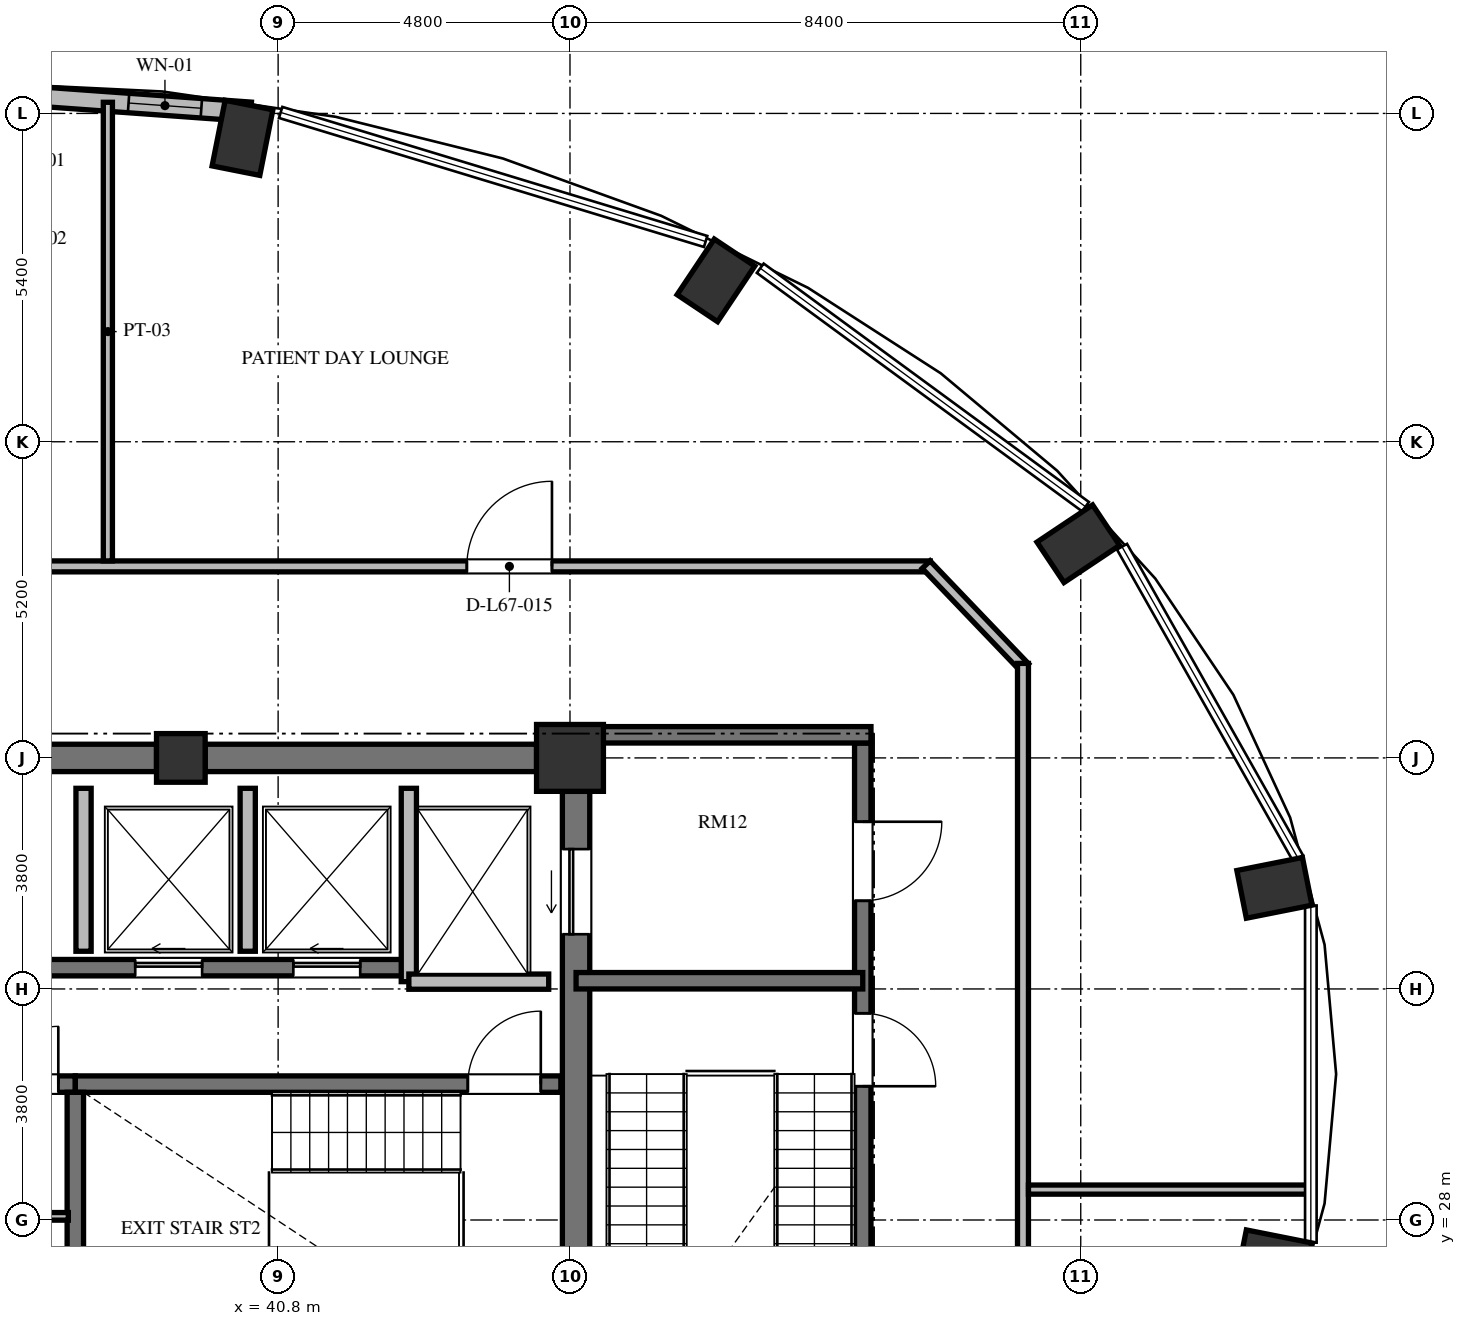
"""IFC4 building model, lengths in metres.
Left out: names, types, materials, properties, quantities, classifications, styles, units other than length and angle.
Written with IfcOpenShell. Run it as: python <this file> out.ifc"""

import sys

from ifc_helpers import new_model, si_unit, direction, frame, frame_2d, origin, origin_2d, place, context, subcontext, project, spatial, rectangle, extrude, element, fill, save


model = new_model("IFC4")
c1 = context("Model", 3, precision=1e-05, world=origin(), true_north=direction((0.0, 1.0)))
c2 = subcontext(c1, "Body", "Model", "MODEL_VIEW")
j1 = project(units=[si_unit("LENGTHUNIT", "METRE"), si_unit("PLANEANGLEUNIT", "RADIAN")], contexts=[c1])
p1 = place(None, origin())
s1 = spatial("IfcSite", under=j1, at=p1, CompositionType="ELEMENT")
p2 = place(p1, origin())
s2 = spatial("IfcBuilding", under=s1, at=p2, CompositionType="ELEMENT")
p3 = place(p2, frame((0.0, 0.0, 258.672)))
s3 = spatial("IfcBuildingStorey", under=s2, at=p3, CompositionType="ELEMENT", Elevation=258.672)
for number, where, z_axis, x_axis in (
    (1, (57.185, 27.337, 0.0), (0.0, 0.0, 1.0), (0.981, -0.195, 0.0)),
    (2, (57.185, 33.463, 0.0), (0.0, 0.0, 1.0), (0.981, 0.195, 0.0)),
    (3, (53.96, 39.123, 0.0), (0.0, 0.0, 1.0), (0.831, 0.556, 0.0)),
    (4, (48.0, 43.454, 0.0), (0.0, 0.0, 1.0), (0.556, 0.831, 0.0)),
    (5, (40.214, 45.798, 0.0), (0.0, 0.0, 1.0), (0.195, 0.981, 0.0)),
):
    element("IfcColumn", number, at=place(p3, frame(where, z_axis=z_axis, x_axis=x_axis)), inside=s3, PredefinedType="COLUMN", context=c2, shape_type="SweptSolid", body=[
        extrude(rectangle(XDim=1.1, YDim=0.8, at=origin_2d()), origin(), (0.0, 0.0, 1.0), 3.648),
    ])
p4 = place(p3, frame((45.6, 35.6, 0.0), z_axis=(0.0, 0.0, 1.0), x_axis=(1.0, 0.0, 0.0)))
e6 = element("IfcColumn", 6, at=p4, inside=s3, PredefinedType="COLUMN", context=c2, shape_type="SweptSolid", body=[
    extrude(rectangle(XDim=1.1, YDim=1.1, at=origin_2d()), origin(), (0.0, 0.0, 1.0), 3.648),
])
p5 = place(p3, frame((39.2, 35.6, 0.0), z_axis=(0.0, 0.0, 1.0), x_axis=(1.0, 0.0, 0.0)))
e7 = element("IfcColumn", 7, at=p5, inside=s3, PredefinedType="COLUMN", context=c2, shape_type="SweptSolid", body=[
    extrude(rectangle(XDim=0.8, YDim=0.8, at=origin_2d()), origin(), (0.0, 0.0, 1.0), 3.648),
])
p6 = place(p3, frame((45.7, 20.95, 0.0), z_axis=(0.0, 0.0, 1.0), x_axis=(0.0, 1.0, 0.0)))
e8 = element("IfcWall", 8, at=p6, inside=s3, PredefinedType="SHEAR", context=c2, shape_type="SweptSolid", body=[
    extrude(rectangle(XDim=14.1, YDim=0.45, at=frame_2d((7.05, 0.0))), origin(), (0.0, 0.0, 1.0), 3.648),
])
p7 = place(p6, frame((11.75, 0.0, 0.0)))
e9 = element("IfcOpeningElement", 9, at=p7, cuts=e8, PredefinedType="OPENING", context=c2, shape_type="SweptSolid", body=[
    extrude(rectangle(XDim=1.4, YDim=2.3, at=frame_2d((0.7, 1.15))), frame((0.0, 0.235, 0.0), z_axis=(0.0, -1.0, 0.0), x_axis=(1.0, 0.0, 0.0)), (0.0, 0.0, 1.0), 0.47),
])
p8 = place(p6, frame((0.95, 0.0, 0.0)))
e10 = element("IfcOpeningElement", 10, at=p8, cuts=e8, PredefinedType="OPENING", context=c2, shape_type="SweptSolid", body=[
    extrude(rectangle(XDim=1.4, YDim=2.3, at=frame_2d((0.7, 1.15))), frame((0.0, 0.235, 0.0), z_axis=(0.0, -1.0, 0.0), x_axis=(1.0, 0.0, 0.0)), (0.0, 0.0, 1.0), 0.47),
])
p9 = place(p3, frame((33.2, 35.6, 0.0), z_axis=(0.0, 0.0, 1.0), x_axis=(1.0, 0.0, 0.0)))
e11 = element("IfcWall", 11, at=p9, inside=s3, PredefinedType="SHEAR", context=c2, shape_type="SweptSolid", body=[
    extrude(rectangle(XDim=5.6, YDim=0.45, at=frame_2d((2.8, 0.0))), origin(), (0.0, 0.0, 1.0), 3.648),
])
p10 = place(p3, frame((39.6, 35.6, 0.0), z_axis=(0.0, 0.0, 1.0), x_axis=(1.0, 0.0, 0.0)))
e12 = element("IfcWall", 12, at=p10, inside=s3, PredefinedType="SHEAR", context=c2, shape_type="SweptSolid", body=[
    extrude(rectangle(XDim=5.45, YDim=0.45, at=frame_2d((2.725, 0.0))), origin(), (0.0, 0.0, 1.0), 3.648),
])
p11 = place(p3, frame((40.35, 46.226, 0.0), z_axis=(0.0, 0.0, 1.0), x_axis=(-0.997409061056, 0.071938619141, 0.0)))
e13 = element("IfcWall", 13, at=p11, inside=s3, PredefinedType="SOLIDWALL", context=c2, shape_type="SweptSolid", body=[
    extrude(rectangle(XDim=4.541, YDim=0.32, at=frame_2d((2.271, 0.0))), origin(), (0.0, 0.0, 1.0), 3.448),
])
p12 = place(p11, frame((0.815, 0.0, 0.85)))
e14 = element("IfcOpeningElement", 14, at=p12, cuts=e13, PredefinedType="OPENING", context=c2, shape_type="SweptSolid", body=[
    extrude(rectangle(XDim=1.2, YDim=2.2, at=frame_2d((0.6, 1.1))), frame((0.0, 0.17, 0.0), z_axis=(0.0, -1.0, 0.0), x_axis=(1.0, 0.0, 0.0)), (0.0, 0.0, 1.0), 0.34),
])
p13 = place(p3, frame((34.535, 30.235, 0.0), z_axis=(0.0, 0.0, 1.0), x_axis=(1.0, 0.0, 0.0)))
e15 = element("IfcWall", 15, at=p13, inside=s3, PredefinedType="SHEAR", context=c2, shape_type="SweptSolid", body=[
    extrude(rectangle(XDim=2.93, YDim=0.27, at=frame_2d((1.465, 0.0))), origin(), (0.0, 0.0, 1.0), 3.648),
])
p14 = place(p13, frame((0.255, 0.0, 0.0)))
e16 = element("IfcOpeningElement", 16, at=p14, cuts=e15, PredefinedType="OPENING", context=c2, shape_type="SweptSolid", body=[
    extrude(rectangle(XDim=1.0, YDim=2.1, at=frame_2d((0.5, 1.05))), frame((0.0, 0.145, 0.0), z_axis=(0.0, -1.0, 0.0), x_axis=(1.0, 0.0, 0.0)), (0.0, 0.0, 1.0), 0.29),
])
p15 = place(p13, frame((1.7, 0.0, 0.0)))
e17 = element("IfcOpeningElement", 17, at=p15, cuts=e15, PredefinedType="OPENING", context=c2, shape_type="SweptSolid", body=[
    extrude(rectangle(XDim=0.95, YDim=2.1, at=frame_2d((0.475, 1.05))), frame((0.0, 0.145, 0.0), z_axis=(0.0, -1.0, 0.0), x_axis=(1.0, 0.0, 0.0)), (0.0, 0.0, 1.0), 0.29),
])
p16 = place(p3, frame((37.465, 30.235, 0.0), z_axis=(0.0, 0.0, 1.0), x_axis=(1.0, 0.0, 0.0)))
e18 = element("IfcWall", 18, at=p16, inside=s3, PredefinedType="SHEAR", context=c2, shape_type="SweptSolid", body=[
    extrude(rectangle(XDim=7.985, YDim=0.27, at=frame_2d((3.992, 0.0))), origin(), (0.0, 0.0, 1.0), 3.648),
])
p17 = place(p16, frame((6.455, 0.0, 0.0)))
e19 = element("IfcOpeningElement", 19, at=p17, cuts=e18, PredefinedType="OPENING", context=c2, shape_type="SweptSolid", body=[
    extrude(rectangle(XDim=1.2, YDim=2.15, at=frame_2d((0.6, 1.075))), frame((0.0, 0.145, 0.0), z_axis=(0.0, -1.0, 0.0), x_axis=(1.0, 0.0, 0.0)), (0.0, 0.0, 1.0), 0.29),
])
p18 = place(p3, frame((37.465, 26.02, 0.0), z_axis=(0.0, 0.0, 1.0), x_axis=(0.0, 1.0, 0.0)))
e20 = element("IfcWall", 20, at=p18, inside=s3, PredefinedType="SHEAR", context=c2, shape_type="SweptSolid", body=[
    extrude(rectangle(XDim=4.08, YDim=0.27, at=frame_2d((2.04, 0.0))), origin(), (0.0, 0.0, 1.0), 3.648),
])
p19 = place(p3, frame((34.65, 28.06, 0.0), z_axis=(0.0, 0.0, 1.0), x_axis=(1.0, 0.0, 0.0)))
e21 = element("IfcWall", 21, at=p19, inside=s3, PredefinedType="PARTITIONING", context=c2, shape_type="SweptSolid", body=[
    extrude(rectangle(XDim=2.7, YDim=0.125, at=frame_2d((1.35, 0.0))), origin(), (0.0, 0.0, 1.0), 3.448),
])
p20 = place(p3, frame((26.55, 32.15, 0.0), z_axis=(0.0, 0.0, 1.0), x_axis=(1.0, 0.0, 0.0)))
e22 = element("IfcWall", 22, at=p20, inside=s3, PredefinedType="SHEAR", context=c2, shape_type="SweptSolid", body=[
    extrude(rectangle(XDim=16.4, YDim=0.27, at=frame_2d((8.2, 0.0))), origin(), (0.0, 0.0, 1.0), 3.648),
])
p21 = place(p20, frame((1.375, 0.0, 0.0)))
e23 = element("IfcOpeningElement", 23, at=p21, cuts=e22, PredefinedType="OPENING", context=c2, shape_type="SweptSolid", body=[
    extrude(rectangle(XDim=1.05, YDim=2.15, at=frame_2d((0.525, 1.075))), frame((0.0, 0.145, 0.0), z_axis=(0.0, -1.0, 0.0), x_axis=(1.0, 0.0, 0.0)), (0.0, 0.0, 1.0), 0.29),
])
p22 = place(p20, frame((4.975, 0.0, 0.0)))
e24 = element("IfcOpeningElement", 24, at=p22, cuts=e22, PredefinedType="OPENING", context=c2, shape_type="SweptSolid", body=[
    extrude(rectangle(XDim=1.05, YDim=2.15, at=frame_2d((0.525, 1.075))), frame((0.0, 0.145, 0.0), z_axis=(0.0, -1.0, 0.0), x_axis=(1.0, 0.0, 0.0)), (0.0, 0.0, 1.0), 0.29),
])
p23 = place(p20, frame((8.625, 0.0, 0.0)))
e25 = element("IfcOpeningElement", 25, at=p23, cuts=e22, PredefinedType="OPENING", context=c2, shape_type="SweptSolid", body=[
    extrude(rectangle(XDim=1.05, YDim=2.15, at=frame_2d((0.525, 1.075))), frame((0.0, 0.145, 0.0), z_axis=(0.0, -1.0, 0.0), x_axis=(1.0, 0.0, 0.0)), (0.0, 0.0, 1.0), 0.29),
])
p24 = place(p20, frame((11.9, 0.0, 0.0)))
e26 = element("IfcOpeningElement", 26, at=p24, cuts=e22, PredefinedType="OPENING", context=c2, shape_type="SweptSolid", body=[
    extrude(rectangle(XDim=1.1, YDim=2.2, at=frame_2d((0.55, 1.1))), frame((0.0, 0.145, 0.0), z_axis=(0.0, -1.0, 0.0), x_axis=(1.0, 0.0, 0.0)), (0.0, 0.0, 1.0), 0.29),
])
p25 = place(p20, frame((14.5, 0.0, 0.0)))
e27 = element("IfcOpeningElement", 27, at=p25, cuts=e22, PredefinedType="OPENING", context=c2, shape_type="SweptSolid", body=[
    extrude(rectangle(XDim=1.1, YDim=2.2, at=frame_2d((0.55, 1.1))), frame((0.0, 0.145, 0.0), z_axis=(0.0, -1.0, 0.0), x_axis=(1.0, 0.0, 0.0)), (0.0, 0.0, 1.0), 0.29),
])
p26 = place(p3, frame((42.95, 31.92, 0.0), z_axis=(0.0, 0.0, 1.0), x_axis=(0.0, 1.0, 0.0)))
e28 = element("IfcWall", 28, at=p26, inside=s3, PredefinedType="SOLIDWALL", context=c2, shape_type="SweptSolid", body=[
    extrude(rectangle(XDim=3.18, YDim=0.25, at=frame_2d((1.59, 0.0))), origin(), (0.0, 0.0, 1.0), 3.448),
])
p27 = place(p3, frame((42.95, 31.92, 0.0), z_axis=(0.0, 0.0, 1.0), x_axis=(1.0, 0.0, 0.0)))
e29 = element("IfcWall", 29, at=p27, inside=s3, PredefinedType="SOLIDWALL", context=c2, shape_type="SweptSolid", body=[
    extrude(rectangle(XDim=2.3, YDim=0.25, at=frame_2d((1.15, 0.0))), origin(), (0.0, 0.0, 1.0), 3.448),
])
for number, where, z_axis, x_axis in (
    (30, (37.6, 32.42, 0.0), (0.0, 0.0, 1.0), (0.0, 1.0, 0.0)),
    (31, (40.3, 32.42, 0.0), (0.0, 0.0, 1.0), (0.0, 1.0, 0.0)),
):
    element("IfcWall", number, at=place(p3, frame(where, z_axis=z_axis, x_axis=x_axis)), inside=s3, PredefinedType="SOLIDWALL", context=c2, shape_type="SweptSolid", body=[
        extrude(rectangle(XDim=2.68, YDim=0.25, at=frame_2d((1.34, 0.0))), origin(), (0.0, 0.0, 1.0), 3.448),
    ])
p28 = place(p3, frame((50.415, 35.845, 0.0), z_axis=(0.0, 0.0, 1.0), x_axis=(0.0, -1.0, 0.0)))
e32 = element("IfcWall", 32, at=p28, inside=s3, PredefinedType="SHEAR", context=c2, shape_type="SweptSolid", body=[
    extrude(rectangle(XDim=15.825, YDim=0.27, at=frame_2d((7.913, 0.0))), origin(), (0.0, 0.0, 1.0), 3.648),
])
p29 = place(p28, frame((4.445, 0.0, 0.0)))
e33 = element("IfcOpeningElement", 33, at=p29, cuts=e32, PredefinedType="OPENING", context=c2, shape_type="SweptSolid", body=[
    extrude(rectangle(XDim=1.2, YDim=2.15, at=frame_2d((0.6, 1.075))), frame((0.0, 0.145, 0.0), z_axis=(0.0, -1.0, 0.0), x_axis=(1.0, 0.0, 0.0)), (0.0, 0.0, 1.0), 0.29),
])
p30 = place(p28, frame((1.295, 0.0, 0.0)))
e34 = element("IfcOpeningElement", 34, at=p30, cuts=e32, PredefinedType="OPENING", context=c2, shape_type="SweptSolid", body=[
    extrude(rectangle(XDim=1.3, YDim=2.2, at=frame_2d((0.65, 1.1))), frame((0.0, 0.145, 0.0), z_axis=(0.0, -1.0, 0.0), x_axis=(1.0, 0.0, 0.0)), (0.0, 0.0, 1.0), 0.29),
])
p31 = place(p28, frame((13.095, 0.0, 0.0)))
e35 = element("IfcOpeningElement", 35, at=p31, cuts=e32, PredefinedType="OPENING", context=c2, shape_type="SweptSolid", body=[
    extrude(rectangle(XDim=1.3, YDim=2.2, at=frame_2d((0.65, 1.1))), frame((0.0, 0.145, 0.0), z_axis=(0.0, -1.0, 0.0), x_axis=(1.0, 0.0, 0.0)), (0.0, 0.0, 1.0), 0.29),
])
p32 = place(p3, frame((45.925, 35.98, 0.0), z_axis=(0.0, 0.0, 1.0), x_axis=(1.0, 0.0, 0.0)))
e36 = element("IfcWall", 36, at=p32, inside=s3, PredefinedType="SHEAR", context=c2, shape_type="SweptSolid", body=[
    extrude(rectangle(XDim=4.625, YDim=0.27, at=frame_2d((2.312, 0.0))), origin(), (0.0, 0.0, 1.0), 3.648),
])
p33 = place(p3, frame((45.7, 31.935, 0.0), z_axis=(0.0, 0.0, 1.0), x_axis=(1.0, 0.0, 0.0)))
e37 = element("IfcWall", 37, at=p33, inside=s3, PredefinedType="SHEAR", context=c2, shape_type="SweptSolid", body=[
    extrude(rectangle(XDim=4.715, YDim=0.27, at=frame_2d((2.357, 0.0))), origin(), (0.0, 0.0, 1.0), 3.648),
])
p34 = place(p3, frame((30.71, 38.75, 0.0), z_axis=(0.0, 0.0, 1.0), x_axis=(1.0, 0.0, 0.0)))
e38 = element("IfcWall", 38, at=p34, inside=s3, PredefinedType="PARTITIONING", context=c2, shape_type="SweptSolid", body=[
    extrude(rectangle(XDim=20.815, YDim=0.18, at=frame_2d((10.408, 0.0))), origin(), (0.0, 0.0, 1.0), 3.073),
])
p35 = place(p34, frame((13.194, 0.0, 0.0)))
e39 = element("IfcOpeningElement", 39, at=p35, cuts=e38, PredefinedType="OPENING", context=c2, shape_type="SweptSolid", body=[
    extrude(rectangle(XDim=1.4, YDim=2.2, at=frame_2d((0.7, 1.1))), frame((0.0, 0.1, 0.0), z_axis=(0.0, -1.0, 0.0), x_axis=(1.0, 0.0, 0.0)), (0.0, 0.0, 1.0), 0.2),
])
p36 = place(p3, frame((51.458, 38.779, 0.0), z_axis=(0.0, 0.0, 1.0), x_axis=(0.691359830363, -0.722510612352, 0.0)))
e40 = element("IfcWall", 40, at=p36, inside=s3, PredefinedType="PARTITIONING", context=c2, shape_type="SweptSolid", body=[
    extrude(rectangle(XDim=2.343, YDim=0.18, at=frame_2d((1.172, 0.0))), origin(), (0.0, 0.0, 1.0), 3.033),
])
p37 = place(p3, frame((53.05, 37.155, 0.0), z_axis=(0.0, 0.0, 1.0), x_axis=(0.0, -1.0, 0.0)))
e41 = element("IfcWall", 41, at=p37, inside=s3, PredefinedType="PARTITIONING", context=c2, shape_type="SweptSolid", body=[
    extrude(rectangle(XDim=13.509, YDim=0.18, at=frame_2d((6.754, 0.0))), origin(), (0.0, 0.0, 1.0), 3.448),
])
p38 = place(p3, frame((53.14, 28.5, 0.0), z_axis=(0.0, 0.0, 1.0), x_axis=(1.0, 0.0, 0.0)))
e42 = element("IfcWall", 42, at=p38, inside=s3, PredefinedType="PARTITIONING", context=c2, shape_type="SweptSolid", body=[
    extrude(rectangle(XDim=4.632, YDim=0.15, at=frame_2d((2.316, 0.0))), origin(), (0.0, 0.0, 1.0), 3.448),
])
p39 = place(p3, frame((38.0, 38.84, 0.0), z_axis=(0.0, 0.0, 1.0), x_axis=(0.0, 1.0, 0.0)))
e43 = element("IfcWall", 43, at=p39, inside=s3, PredefinedType="PARTITIONING", context=c2, shape_type="SweptSolid", body=[
    extrude(rectangle(XDim=7.543, YDim=0.15, at=frame_2d((3.771, 0.0))), origin(), (0.0, 0.0, 1.0), 3.448),
])
p40 = place(p12, origin())
e44 = element("IfcWindow", 44, at=p40, inside=s3, PartitioningType="SINGLE_PANEL", PredefinedType="WINDOW", context=c2, shape_type="SweptSolid", body=[
    extrude(rectangle(XDim=1.2, YDim=2.2, at=frame_2d((0.6, 1.1))), frame((0.0, 0.03, 0.0), z_axis=(0.0, -1.0, 0.0), x_axis=(1.0, 0.0, 0.0)), (0.0, 0.0, 1.0), 0.06),
])
fill(e14, e44)
p41 = place(p17, origin())
e45 = element("IfcDoor", 45, at=p41, inside=s3, OperationType="SINGLE_SWING_RIGHT", PredefinedType="DOOR", context=c2, shape_type="SweptSolid", body=[
    extrude(rectangle(XDim=1.2, YDim=2.15, at=frame_2d((0.6, 1.075))), frame((0.0, 0.025, 0.0), z_axis=(0.0, -1.0, 0.0), x_axis=(1.0, 0.0, 0.0)), (0.0, 0.0, 1.0), 0.05),
])
fill(e19, e45)
p42 = place(p15, origin())
e46 = element("IfcDoor", 46, at=p42, inside=s3, OperationType="SINGLE_SWING_RIGHT", PredefinedType="DOOR", context=c2, shape_type="SweptSolid", body=[
    extrude(rectangle(XDim=0.95, YDim=2.1, at=frame_2d((0.475, 1.05))), frame((0.0, 0.025, 0.0), z_axis=(0.0, -1.0, 0.0), x_axis=(1.0, 0.0, 0.0)), (0.0, 0.0, 1.0), 0.05),
])
fill(e17, e46)
p43 = place(p24, origin())
e47 = element("IfcDoor", 47, at=p43, inside=s3, OperationType="SLIDING_TO_LEFT", PredefinedType="DOOR", context=c2, shape_type="SweptSolid", body=[
    extrude(rectangle(XDim=1.1, YDim=2.2, at=frame_2d((0.55, 1.1))), frame((0.0, 0.025, 0.0), z_axis=(0.0, -1.0, 0.0), x_axis=(1.0, 0.0, 0.0)), (0.0, 0.0, 1.0), 0.05),
])
fill(e26, e47)
p44 = place(p25, origin())
e48 = element("IfcDoor", 48, at=p44, inside=s3, OperationType="SLIDING_TO_LEFT", PredefinedType="DOOR", context=c2, shape_type="SweptSolid", body=[
    extrude(rectangle(XDim=1.1, YDim=2.2, at=frame_2d((0.55, 1.1))), frame((0.0, 0.025, 0.0), z_axis=(0.0, -1.0, 0.0), x_axis=(1.0, 0.0, 0.0)), (0.0, 0.0, 1.0), 0.05),
])
fill(e27, e48)
p45 = place(p7, origin())
e49 = element("IfcDoor", 49, at=p45, inside=s3, OperationType="SLIDING_TO_LEFT", PredefinedType="DOOR", context=c2, shape_type="SweptSolid", body=[
    extrude(rectangle(XDim=1.4, YDim=2.3, at=frame_2d((0.7, 1.15))), frame((0.0, 0.025, 0.0), z_axis=(0.0, -1.0, 0.0), x_axis=(1.0, 0.0, 0.0)), (0.0, 0.0, 1.0), 0.05),
])
fill(e9, e49)
p46 = place(p29, origin())
e50 = element("IfcDoor", 50, at=p46, inside=s3, OperationType="SINGLE_SWING_RIGHT", PredefinedType="DOOR", context=c2, shape_type="SweptSolid", body=[
    extrude(rectangle(XDim=1.2, YDim=2.15, at=frame_2d((0.6, 1.075))), frame((0.0, 0.025, 0.0), z_axis=(0.0, -1.0, 0.0), x_axis=(1.0, 0.0, 0.0)), (0.0, 0.0, 1.0), 0.05),
])
fill(e33, e50)
p47 = place(p30, origin())
e51 = element("IfcDoor", 51, at=p47, inside=s3, OperationType="SINGLE_SWING_LEFT", PredefinedType="DOOR", context=c2, shape_type="SweptSolid", body=[
    extrude(rectangle(XDim=1.3, YDim=2.2, at=frame_2d((0.65, 1.1))), frame((0.0, 0.025, 0.0), z_axis=(0.0, -1.0, 0.0), x_axis=(1.0, 0.0, 0.0)), (0.0, 0.0, 1.0), 0.05),
])
fill(e34, e51)
p48 = place(p35, origin())
e52 = element("IfcDoor", 52, at=p48, inside=s3, OperationType="SINGLE_SWING_RIGHT", PredefinedType="DOOR", context=c2, shape_type="SweptSolid", body=[
    extrude(rectangle(XDim=1.4, YDim=2.2, at=frame_2d((0.7, 1.1))), frame((0.0, 0.025, 0.0), z_axis=(0.0, -1.0, 0.0), x_axis=(1.0, 0.0, 0.0)), (0.0, 0.0, 1.0), 0.05),
])
fill(e39, e52)
save(model, sys.argv[1])
